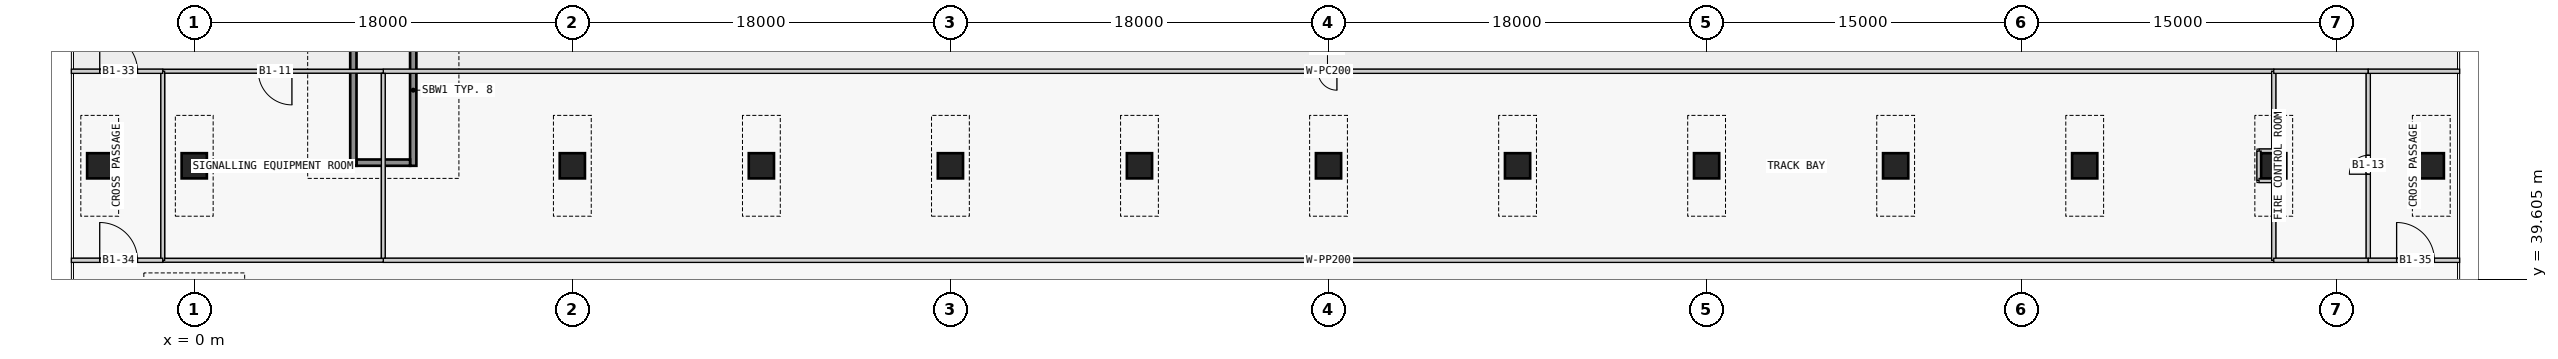
"""IFC4 building model, lengths in metres.
Left out: names, types, materials, properties, quantities, classifications, styles, units other than length and angle.
Written with IfcOpenShell. Run it as: python <this file> out.ifc"""

import sys

from ifc_helpers import new_model, si_unit, direction, frame, frame_2d, origin, origin_2d, place, context, subcontext, project, spatial, rectangle, extrude, element, fill, save


model = new_model("IFC4")
c1 = context("Model", 3, precision=1e-05, world=origin(), true_north=direction((0.0, 1.0)))
c2 = subcontext(c1, "Body", "Model", "MODEL_VIEW")
j1 = project(units=[si_unit("LENGTHUNIT", "METRE"), si_unit("PLANEANGLEUNIT", "RADIAN")], contexts=[c1])
p1 = place(None, origin())
s1 = spatial("IfcSite", under=j1, at=p1, CompositionType="ELEMENT")
p2 = place(p1, origin())
s2 = spatial("IfcBuilding", under=s1, at=p2, CompositionType="ELEMENT")
p3 = place(p2, frame((0.0, 0.0, -7.0)))
s3 = spatial("IfcBuildingStorey", under=s2, at=p3, CompositionType="ELEMENT", Elevation=-7.0)
for number, where, z_axis, x_axis in (
    (1, (-4.5, 45.0, 0.0), (0.0, 0.0, 1.0), (1.0, 0.0, 0.0)),
    (2, (0.0, 45.0, 0.0), (0.0, 0.0, 1.0), (1.0, 0.0, 0.0)),
    (3, (18.0, 45.0, 0.0), (0.0, 0.0, 1.0), (1.0, 0.0, 0.0)),
    (4, (27.0, 45.0, 0.0), (0.0, 0.0, 1.0), (1.0, 0.0, 0.0)),
    (5, (36.0, 45.0, 0.0), (0.0, 0.0, 1.0), (1.0, 0.0, 0.0)),
    (6, (45.0, 45.0, 0.0), (0.0, 0.0, 1.0), (1.0, 0.0, 0.0)),
    (7, (54.0, 45.0, 0.0), (0.0, 0.0, 1.0), (1.0, 0.0, 0.0)),
    (8, (63.0, 45.0, 0.0), (0.0, 0.0, 1.0), (1.0, 0.0, 0.0)),
    (9, (72.0, 45.0, 0.0), (0.0, 0.0, 1.0), (1.0, 0.0, 0.0)),
    (10, (81.0, 45.0, 0.0), (0.0, 0.0, 1.0), (1.0, 0.0, 0.0)),
    (11, (90.0, 45.0, 0.0), (0.0, 0.0, 1.0), (1.0, 0.0, 0.0)),
    (12, (99.0, 45.0, 0.0), (0.0, 0.0, 1.0), (1.0, 0.0, 0.0)),
    (13, (106.5, 45.0, 0.0), (0.0, 0.0, 1.0), (1.0, 0.0, 0.0)),
):
    element("IfcColumn", number, at=place(p3, frame(where, z_axis=z_axis, x_axis=x_axis)), inside=s3, PredefinedType="COLUMN", context=c2, shape_type="SweptSolid", body=[
        extrude(rectangle(XDim=1.2, YDim=1.2, at=origin_2d()), origin(), (0.0, 0.0, 1.0), 7.0),
    ])
p4 = place(p3, frame((7.725, 45.15, 0.0), z_axis=(0.0, 0.0, 1.0), x_axis=(1.0, 0.0, 0.0)))
e14 = element("IfcWall", 14, at=p4, inside=s3, PredefinedType="SHEAR", context=c2, shape_type="SweptSolid", body=[
    extrude(rectangle(XDim=2.55, YDim=0.3, at=frame_2d((1.275, 0.0))), origin(), (0.0, 0.0, 1.0), 6.55),
])
for number, where, z_axis, x_axis in (
    (15, (7.575, 45.0, 0.0), (0.0, 0.0, 1.0), (0.0, 1.0, 0.0)),
    (16, (10.425, 45.0, 0.0), (0.0, 0.0, 1.0), (0.0, 1.0, 0.0)),
):
    element("IfcWall", number, at=place(p3, frame(where, z_axis=z_axis, x_axis=x_axis)), inside=s3, PredefinedType="SHEAR", context=c2, shape_type="SweptSolid", body=[
        extrude(rectangle(XDim=7.2, YDim=0.3, at=frame_2d((3.6, 0.0))), origin(), (0.0, 0.0, 1.0), 6.55),
    ])
p5 = place(p3, frame((99.0, 49.5, 0.0), z_axis=(0.0, 0.0, 1.0), x_axis=(-1.0, 0.0, 0.0)))
e17 = element("IfcWall", 17, at=p5, inside=s3, PredefinedType="PARTITIONING", context=c2, shape_type="SweptSolid", body=[
    extrude(rectangle(XDim=90.0, YDim=0.2, at=frame_2d((45.0, 0.0))), origin(), (0.0, 0.0, 1.0), 6.55),
])
p6 = place(p5, frame((44.6, 0.0, 0.0)))
e18 = element("IfcOpeningElement", 18, at=p6, cuts=e17, PredefinedType="OPENING", context=c2, shape_type="SweptSolid", body=[
    extrude(rectangle(XDim=0.9, YDim=2.1, at=frame_2d((0.45, 1.05))), frame((0.0, 0.11, 0.0), z_axis=(0.0, -1.0, 0.0), x_axis=(1.0, 0.0, 0.0)), (0.0, 0.0, 1.0), 0.22),
])
p7 = place(p3, frame((9.0, 40.5, 0.0), z_axis=(0.0, 0.0, 1.0), x_axis=(1.0, 0.0, 0.0)))
e19 = element("IfcWall", 19, at=p7, inside=s3, PredefinedType="PARTITIONING", context=c2, shape_type="SweptSolid", body=[
    extrude(rectangle(XDim=90.0, YDim=0.2, at=frame_2d((45.0, 0.0))), origin(), (0.0, 0.0, 1.0), 6.55),
])
p8 = place(p3, frame((9.0, 49.5, 0.0), z_axis=(0.0, 0.0, 1.0), x_axis=(-1.0, 0.0, 0.0)))
e20 = element("IfcWall", 20, at=p8, inside=s3, PredefinedType="PARTITIONING", context=c2, shape_type="SweptSolid", body=[
    extrude(rectangle(XDim=10.5, YDim=0.18, at=frame_2d((5.25, 0.0))), origin(), (0.0, 0.0, 1.0), 6.55),
])
p9 = place(p8, frame((4.35, 0.0, 0.0)))
e21 = element("IfcOpeningElement", 21, at=p9, cuts=e20, PredefinedType="OPENING", context=c2, shape_type="SweptSolid", body=[
    extrude(rectangle(XDim=1.6, YDim=2.4, at=frame_2d((0.8, 1.2))), frame((0.0, 0.1, 0.0), z_axis=(0.0, -1.0, 0.0), x_axis=(1.0, 0.0, 0.0)), (0.0, 0.0, 1.0), 0.2),
])
p10 = place(p3, frame((-1.5, 40.5, 0.0), z_axis=(0.0, 0.0, 1.0), x_axis=(1.0, 0.0, 0.0)))
e22 = element("IfcWall", 22, at=p10, inside=s3, PredefinedType="PARTITIONING", context=c2, shape_type="SweptSolid", body=[
    extrude(rectangle(XDim=10.5, YDim=0.18, at=frame_2d((5.25, 0.0))), origin(), (0.0, 0.0, 1.0), 6.55),
])
p11 = place(p3, frame((99.0, 49.5, 0.0), z_axis=(0.0, 0.0, 1.0), x_axis=(0.0, -1.0, 0.0)))
e23 = element("IfcWall", 23, at=p11, inside=s3, PredefinedType="PARTITIONING", context=c2, shape_type="SweptSolid", body=[
    extrude(rectangle(XDim=3.8, YDim=0.2, at=frame_2d((1.9, 0.0))), origin(), (0.0, 0.0, 1.0), 6.55),
])
p12 = place(p3, frame((99.0, 45.7, 0.0), z_axis=(0.0, 0.0, 1.0), x_axis=(-1.0, 0.0, 0.0)))
e24 = element("IfcWall", 24, at=p12, inside=s3, PredefinedType="PARTITIONING", context=c2, shape_type="SweptSolid", body=[
    extrude(rectangle(XDim=0.7, YDim=0.2, at=frame_2d((0.35, 0.0))), origin(), (0.0, 0.0, 1.0), 6.55),
])
p13 = place(p3, frame((98.3, 45.7, 0.0), z_axis=(0.0, 0.0, 1.0), x_axis=(0.0, -1.0, 0.0)))
e25 = element("IfcWall", 25, at=p13, inside=s3, PredefinedType="PARTITIONING", context=c2, shape_type="SweptSolid", body=[
    extrude(rectangle(XDim=1.4, YDim=0.2, at=frame_2d((0.7, 0.0))), origin(), (0.0, 0.0, 1.0), 6.55),
])
p14 = place(p3, frame((98.3, 44.3, 0.0), z_axis=(0.0, 0.0, 1.0), x_axis=(1.0, 0.0, 0.0)))
e26 = element("IfcWall", 26, at=p14, inside=s3, PredefinedType="PARTITIONING", context=c2, shape_type="SweptSolid", body=[
    extrude(rectangle(XDim=0.7, YDim=0.2, at=frame_2d((0.35, 0.0))), origin(), (0.0, 0.0, 1.0), 6.55),
])
p15 = place(p3, frame((99.0, 44.3, 0.0), z_axis=(0.0, 0.0, 1.0), x_axis=(0.0, -1.0, 0.0)))
e27 = element("IfcWall", 27, at=p15, inside=s3, PredefinedType="PARTITIONING", context=c2, shape_type="SweptSolid", body=[
    extrude(rectangle(XDim=3.8, YDim=0.2, at=frame_2d((1.9, 0.0))), origin(), (0.0, 0.0, 1.0), 6.55),
])
p16 = place(p3, frame((-1.5, 49.5, 0.0), z_axis=(0.0, 0.0, 1.0), x_axis=(0.0, -1.0, 0.0)))
e28 = element("IfcWall", 28, at=p16, inside=s3, PredefinedType="PARTITIONING", context=c2, shape_type="SweptSolid", body=[
    extrude(rectangle(XDim=9.0, YDim=0.18, at=frame_2d((4.5, 0.0))), origin(), (0.0, 0.0, 1.0), 6.55),
])
p17 = place(p3, frame((9.0, 40.6, 0.0), z_axis=(0.0, 0.0, 1.0), x_axis=(0.0, 1.0, 0.0)))
e29 = element("IfcWall", 29, at=p17, inside=s3, PredefinedType="PARTITIONING", context=c2, shape_type="SweptSolid", body=[
    extrude(rectangle(XDim=8.8, YDim=0.18, at=frame_2d((4.4, 0.0))), origin(), (0.0, 0.0, 1.0), 6.55),
])
p18 = place(p3, frame((103.5, 40.5, 0.0), z_axis=(0.0, 0.0, 1.0), x_axis=(0.0, 1.0, 0.0)))
e30 = element("IfcWall", 30, at=p18, inside=s3, PredefinedType="PARTITIONING", context=c2, shape_type="SweptSolid", body=[
    extrude(rectangle(XDim=9.0, YDim=0.2, at=frame_2d((4.5, 0.0))), origin(), (0.0, 0.0, 1.0), 6.55),
])
p19 = place(p18, frame((4.1, 0.0, 0.0)))
e31 = element("IfcOpeningElement", 31, at=p19, cuts=e30, PredefinedType="OPENING", context=c2, shape_type="SweptSolid", body=[
    extrude(rectangle(XDim=0.9, YDim=2.1, at=frame_2d((0.45, 1.05))), frame((0.0, 0.11, 0.0), z_axis=(0.0, -1.0, 0.0), x_axis=(1.0, 0.0, 0.0)), (0.0, 0.0, 1.0), 0.22),
])
for number, where, z_axis, x_axis in (
    (32, (103.5, 49.5, 0.0), (0.0, 0.0, 1.0), (-1.0, 0.0, 0.0)),
    (33, (99.0, 40.5, 0.0), (0.0, 0.0, 1.0), (1.0, 0.0, 0.0)),
):
    element("IfcWall", number, at=place(p3, frame(where, z_axis=z_axis, x_axis=x_axis)), inside=s3, PredefinedType="PARTITIONING", context=c2, shape_type="SweptSolid", body=[
        extrude(rectangle(XDim=4.5, YDim=0.2, at=frame_2d((2.25, 0.0))), origin(), (0.0, 0.0, 1.0), 6.55),
    ])
p20 = place(p3, frame((-5.85, 40.5, 0.0), z_axis=(0.0, 0.0, 1.0), x_axis=(1.0, 0.0, 0.0)))
e34 = element("IfcWall", 34, at=p20, inside=s3, PredefinedType="PARTITIONING", context=c2, shape_type="SweptSolid", body=[
    extrude(rectangle(XDim=4.35, YDim=0.2, at=frame_2d((2.175, 0.0))), origin(), (0.0, 0.0, 1.0), 6.55),
])
p21 = place(p20, frame((1.35, 0.0, 0.0)))
e35 = element("IfcOpeningElement", 35, at=p21, cuts=e34, PredefinedType="OPENING", context=c2, shape_type="SweptSolid", body=[
    extrude(rectangle(XDim=1.8, YDim=2.1, at=frame_2d((0.9, 1.05))), frame((0.0, 0.11, 0.0), z_axis=(0.0, -1.0, 0.0), x_axis=(1.0, 0.0, 0.0)), (0.0, 0.0, 1.0), 0.22),
])
p22 = place(p3, frame((-5.85, 49.5, 0.0), z_axis=(0.0, 0.0, 1.0), x_axis=(1.0, 0.0, 0.0)))
e36 = element("IfcWall", 36, at=p22, inside=s3, PredefinedType="PARTITIONING", context=c2, shape_type="SweptSolid", body=[
    extrude(rectangle(XDim=4.35, YDim=0.2, at=frame_2d((2.175, 0.0))), origin(), (0.0, 0.0, 1.0), 6.55),
])
p23 = place(p22, frame((1.35, 0.0, 0.0)))
e37 = element("IfcOpeningElement", 37, at=p23, cuts=e36, PredefinedType="OPENING", context=c2, shape_type="SweptSolid", body=[
    extrude(rectangle(XDim=1.8, YDim=2.1, at=frame_2d((0.9, 1.05))), frame((0.0, 0.11, 0.0), z_axis=(0.0, -1.0, 0.0), x_axis=(1.0, 0.0, 0.0)), (0.0, 0.0, 1.0), 0.22),
])
p24 = place(p3, frame((103.5, 40.5, 0.0), z_axis=(0.0, 0.0, 1.0), x_axis=(1.0, 0.0, 0.0)))
e38 = element("IfcWall", 38, at=p24, inside=s3, PredefinedType="PARTITIONING", context=c2, shape_type="SweptSolid", body=[
    extrude(rectangle(XDim=4.35, YDim=0.2, at=frame_2d((2.175, 0.0))), origin(), (0.0, 0.0, 1.0), 6.55),
])
p25 = place(p24, frame((1.35, 0.0, 0.0)))
e39 = element("IfcOpeningElement", 39, at=p25, cuts=e38, PredefinedType="OPENING", context=c2, shape_type="SweptSolid", body=[
    extrude(rectangle(XDim=1.8, YDim=2.1, at=frame_2d((0.9, 1.05))), frame((0.0, 0.11, 0.0), z_axis=(0.0, -1.0, 0.0), x_axis=(1.0, 0.0, 0.0)), (0.0, 0.0, 1.0), 0.22),
])
p26 = place(p3, frame((103.5, 49.5, 0.0), z_axis=(0.0, 0.0, 1.0), x_axis=(1.0, 0.0, 0.0)))
e40 = element("IfcWall", 40, at=p26, inside=s3, PredefinedType="PARTITIONING", context=c2, shape_type="SweptSolid", body=[
    extrude(rectangle(XDim=4.35, YDim=0.2, at=frame_2d((2.175, 0.0))), origin(), (0.0, 0.0, 1.0), 6.55),
])
p27 = place(p6, origin())
e41 = element("IfcDoor", 41, at=p27, inside=s3, OperationType="SINGLE_SWING_LEFT", PredefinedType="DOOR", context=c2, shape_type="SweptSolid", body=[
    extrude(rectangle(XDim=0.9, YDim=2.1, at=frame_2d((0.45, 1.05))), frame((0.0, 0.025, 0.0), z_axis=(0.0, -1.0, 0.0), x_axis=(1.0, 0.0, 0.0)), (0.0, 0.0, 1.0), 0.05),
])
fill(e18, e41)
p28 = place(p9, origin())
e42 = element("IfcDoor", 42, at=p28, inside=s3, OperationType="SINGLE_SWING_LEFT", PredefinedType="DOOR", context=c2, shape_type="SweptSolid", body=[
    extrude(rectangle(XDim=1.6, YDim=2.4, at=frame_2d((0.8, 1.2))), frame((0.0, 0.025, 0.0), z_axis=(0.0, -1.0, 0.0), x_axis=(1.0, 0.0, 0.0)), (0.0, 0.0, 1.0), 0.05),
])
fill(e21, e42)
p29 = place(p19, origin())
e43 = element("IfcDoor", 43, at=p29, inside=s3, OperationType="SINGLE_SWING_LEFT", PredefinedType="DOOR", context=c2, shape_type="SweptSolid", body=[
    extrude(rectangle(XDim=0.9, YDim=2.1, at=frame_2d((0.45, 1.05))), frame((0.0, 0.025, 0.0), z_axis=(0.0, -1.0, 0.0), x_axis=(1.0, 0.0, 0.0)), (0.0, 0.0, 1.0), 0.05),
])
fill(e31, e43)
p30 = place(p23, origin())
e44 = element("IfcDoor", 44, at=p30, inside=s3, OperationType="DOUBLE_DOOR_SINGLE_SWING", PredefinedType="DOOR", context=c2, shape_type="SweptSolid", body=[
    extrude(rectangle(XDim=1.8, YDim=2.1, at=frame_2d((0.9, 1.05))), frame((0.0, 0.025, 0.0), z_axis=(0.0, -1.0, 0.0), x_axis=(1.0, 0.0, 0.0)), (0.0, 0.0, 1.0), 0.05),
])
fill(e37, e44)
p31 = place(p21, origin())
e45 = element("IfcDoor", 45, at=p31, inside=s3, OperationType="DOUBLE_DOOR_SINGLE_SWING", PredefinedType="DOOR", context=c2, shape_type="SweptSolid", body=[
    extrude(rectangle(XDim=1.8, YDim=2.1, at=frame_2d((0.9, 1.05))), frame((0.0, 0.025, 0.0), z_axis=(0.0, -1.0, 0.0), x_axis=(1.0, 0.0, 0.0)), (0.0, 0.0, 1.0), 0.05),
])
fill(e35, e45)
p32 = place(p25, origin())
e46 = element("IfcDoor", 46, at=p32, inside=s3, OperationType="DOUBLE_DOOR_SINGLE_SWING", PredefinedType="DOOR", context=c2, shape_type="SweptSolid", body=[
    extrude(rectangle(XDim=1.8, YDim=2.1, at=frame_2d((0.9, 1.05))), frame((0.0, 0.025, 0.0), z_axis=(0.0, -1.0, 0.0), x_axis=(1.0, 0.0, 0.0)), (0.0, 0.0, 1.0), 0.05),
])
fill(e39, e46)
save(model, sys.argv[1])
